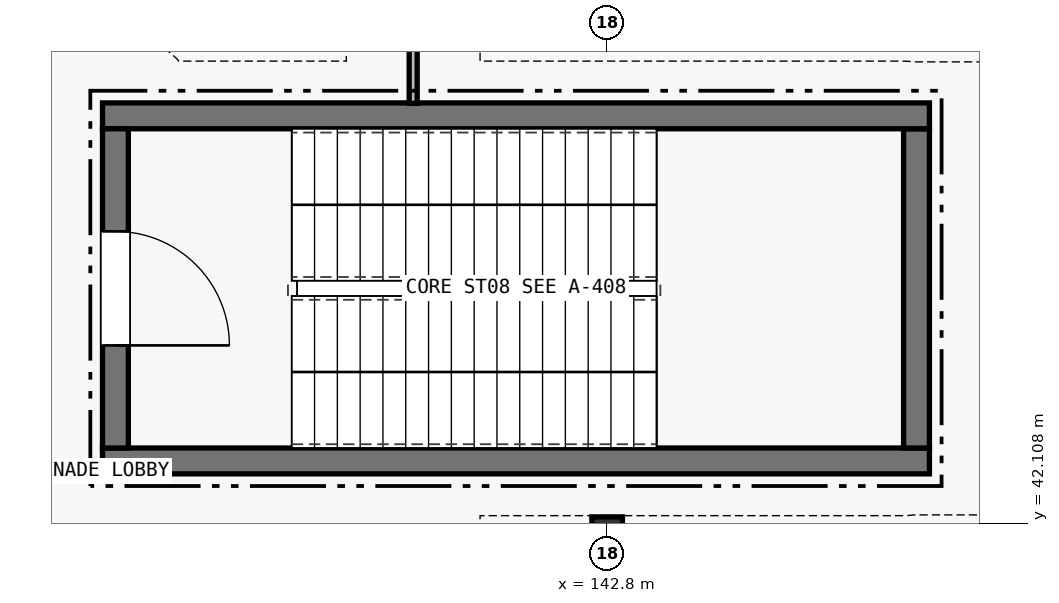
"""IFC4 building model, lengths in metres.
Left out: names, types, materials, properties, quantities, classifications, styles, units other than length and angle.
Written with IfcOpenShell. Run it as: python <this file> out.ifc"""

import sys

from ifc_helpers import new_model, si_unit, direction, frame, frame_2d, origin, origin_2d, place, context, subcontext, project, spatial, rectangle, i_section, extrude, element, fill, save


model = new_model("IFC4")
c1 = context("Model", 3, precision=1e-05, world=origin(), true_north=direction((0.0, 1.0)))
c2 = subcontext(c1, "Body", "Model", "MODEL_VIEW")
j1 = project(units=[si_unit("LENGTHUNIT", "METRE"), si_unit("PLANEANGLEUNIT", "RADIAN")], contexts=[c1])
p1 = place(None, origin())
s1 = spatial("IfcSite", under=j1, at=p1, CompositionType="ELEMENT")
p2 = place(p1, origin())
s2 = spatial("IfcBuilding", under=s1, at=p2, CompositionType="ELEMENT")
p3 = place(p2, frame((0.0, 0.0, 16.5)))
s3 = spatial("IfcBuildingStorey", under=s2, at=p3, CompositionType="ELEMENT", Elevation=16.5)
p4 = place(p3, frame((142.8, 42.0, 0.0), z_axis=(0.0, 0.0, 1.0), x_axis=(1.0, 0.0, 0.0)))
e1 = element("IfcColumn", 1, at=p4, inside=s3, PredefinedType="COLUMN", context=c2, shape_type="SweptSolid", body=[
    extrude(i_section(OverallWidth=0.402, OverallDepth=0.388, WebThickness=0.015, FlangeThickness=0.015, FilletRadius=0.022, at=origin_2d()), origin(), (0.0, 0.0, 1.0), 5.1),
])
p5 = place(p3, frame((136.16, 42.93, 0.0), z_axis=(0.0, 0.0, 1.0), x_axis=(1.0, 0.0, 0.0)))
e2 = element("IfcWall", 2, at=p5, inside=s3, PredefinedType="SHEAR", context=c2, shape_type="SweptSolid", body=[
    extrude(rectangle(XDim=10.88, YDim=0.34, at=frame_2d((5.44, 0.0))), origin(), (0.0, 0.0, 1.0), 4.845),
])
p6 = place(p3, frame((146.87, 43.1, 0.0), z_axis=(0.0, 0.0, 1.0), x_axis=(0.0, 1.0, 0.0)))
e3 = element("IfcWall", 3, at=p6, inside=s3, PredefinedType="SHEAR", context=c2, shape_type="SweptSolid", body=[
    extrude(rectangle(XDim=4.2, YDim=0.34, at=frame_2d((2.1, 0.0))), origin(), (0.0, 0.0, 1.0), 4.845),
])
p7 = place(p3, frame((147.04, 47.47, 0.0), z_axis=(0.0, 0.0, 1.0), x_axis=(-1.0, 0.0, 0.0)))
e4 = element("IfcWall", 4, at=p7, inside=s3, PredefinedType="SHEAR", context=c2, shape_type="SweptSolid", body=[
    extrude(rectangle(XDim=10.88, YDim=0.34, at=frame_2d((5.44, 0.0))), origin(), (0.0, 0.0, 1.0), 4.845),
])
p8 = place(p3, frame((136.33, 47.3, 0.0), z_axis=(0.0, 0.0, 1.0), x_axis=(0.0, -1.0, 0.0)))
e5 = element("IfcWall", 5, at=p8, inside=s3, PredefinedType="SHEAR", context=c2, shape_type="SweptSolid", body=[
    extrude(rectangle(XDim=4.2, YDim=0.34, at=frame_2d((2.1, 0.0))), origin(), (0.0, 0.0, 1.0), 4.845),
])
p9 = place(p8, frame((1.35, 0.0, 0.0)))
e6 = element("IfcOpeningElement", 6, at=p9, cuts=e5, PredefinedType="OPENING", context=c2, shape_type="SweptSolid", body=[
    extrude(rectangle(XDim=1.5, YDim=2.15, at=frame_2d((0.75, 1.075))), frame((0.0, 0.18, 0.0), z_axis=(0.0, -1.0, 0.0), x_axis=(1.0, 0.0, 0.0)), (0.0, 0.0, 1.0), 0.36),
])
p10 = place(p3, frame((140.248, 47.635, 0.0), z_axis=(0.0, 0.0, 1.0), x_axis=(0.0, 1.0, 0.0)))
e7 = element("IfcWall", 7, at=p10, inside=s3, PredefinedType="PARTITIONING", context=c2, shape_type="SweptSolid", body=[
    extrude(rectangle(XDim=2.47, YDim=0.105, at=frame_2d((1.235, 0.0))), origin(), (0.0, 0.0, 1.0), 4.845),
])
p11 = place(p9, origin())
e8 = element("IfcDoor", 8, at=p11, inside=s3, OperationType="SINGLE_SWING_RIGHT", PredefinedType="DOOR", context=c2, shape_type="SweptSolid", body=[
    extrude(rectangle(XDim=1.5, YDim=2.15, at=frame_2d((0.75, 1.075))), frame((0.0, 0.025, 0.0), z_axis=(0.0, -1.0, 0.0), x_axis=(1.0, 0.0, 0.0)), (0.0, 0.0, 1.0), 0.05),
])
fill(e6, e8)
save(model, sys.argv[1])
